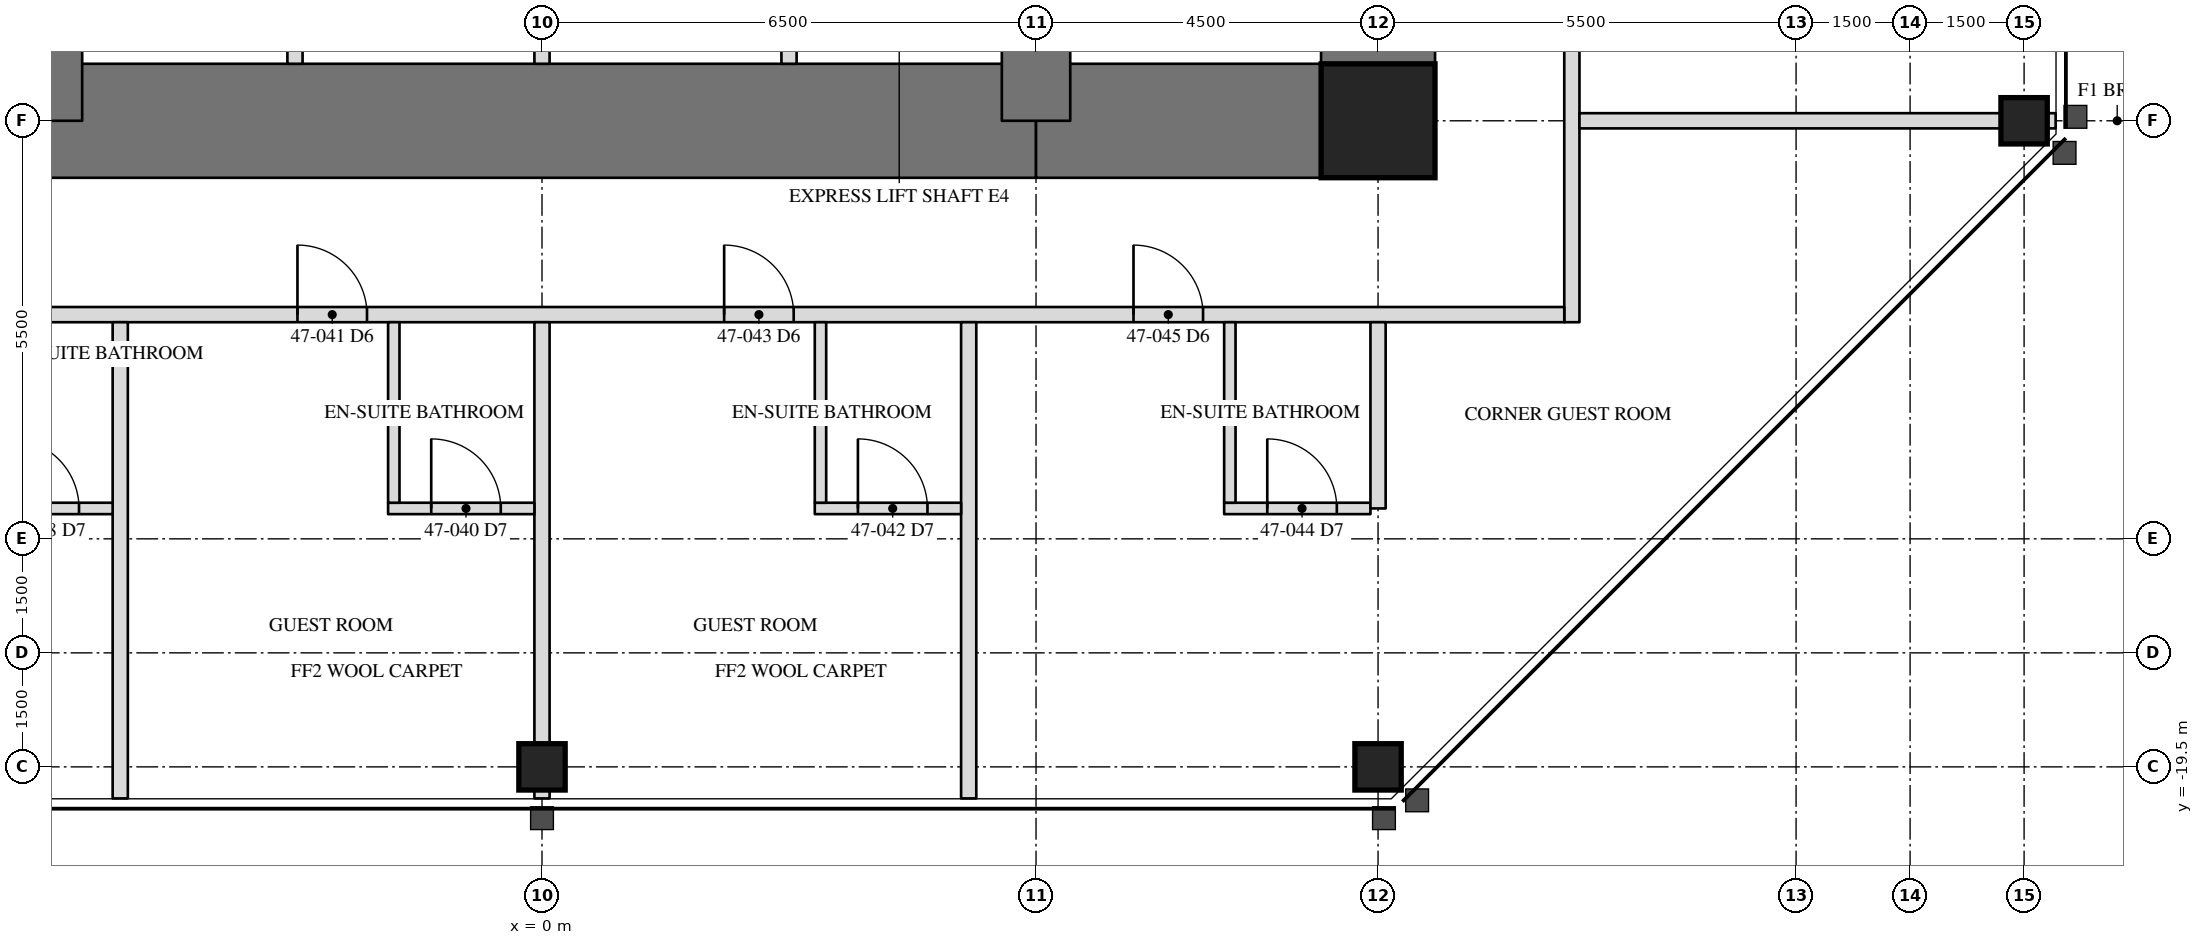
"""IFC4 building model, lengths in metres.
Left out: names, types, materials, properties, quantities, classifications, styles, units other than length and angle.
Written with IfcOpenShell. Run it as: python <this file> out.ifc"""

import sys

from ifc_helpers import new_model, si_unit, direction, frame, frame_2d, origin, origin_2d, place, context, subcontext, project, spatial, rectangle, hollow_rectangle, extrude, element, fill, save


model = new_model("IFC4")
c1 = context("Model", 3, precision=1e-05, world=origin(), true_north=direction((0.0, 1.0)))
c2 = subcontext(c1, "Body", "Model", "MODEL_VIEW")
j1 = project(units=[si_unit("LENGTHUNIT", "METRE"), si_unit("PLANEANGLEUNIT", "RADIAN")], contexts=[c1])
p1 = place(None, origin())
s1 = spatial("IfcSite", under=j1, at=p1, CompositionType="ELEMENT")
p2 = place(p1, origin())
s2 = spatial("IfcBuilding", under=s1, at=p2, CompositionType="ELEMENT")
p3 = place(p2, frame((0.0, 0.0, 201.2)))
s3 = spatial("IfcBuildingStorey", under=s2, at=p3, CompositionType="ELEMENT", Elevation=201.2)
for number, where, z_axis, x_axis in (
    (1, (0.0, -19.5, 0.0), (0.0, 0.0, 1.0), (1.0, 0.0, 0.0)),
    (2, (11.0, -19.5, 0.0), (0.0, 0.0, 1.0), (1.0, 0.0, 0.0)),
    (3, (19.5, -11.0, 0.0), (0.0, 0.0, 1.0), (0.0, 1.0, 0.0)),
):
    element("IfcColumn", number, at=place(p3, frame(where, z_axis=z_axis, x_axis=x_axis)), inside=s3, PredefinedType="COLUMN", context=c2, shape_type="SweptSolid", body=[
        extrude(hollow_rectangle(XDim=0.61, YDim=0.61, WallThickness=0.076, at=origin_2d()), origin(), (0.0, 0.0, 1.0), 3.5),
    ])
p4 = place(p3, frame((11.0, -11.0, 0.0), z_axis=(0.0, 0.0, 1.0), x_axis=(0.0, 1.0, 0.0)))
e4 = element("IfcWall", 4, at=p4, inside=s3, PredefinedType="SHEAR", context=c2, shape_type="SweptSolid", body=[
    extrude(rectangle(XDim=22.0, YDim=1.5, at=frame_2d((11.0, 0.0))), origin(), (0.0, 0.0, 1.0), 3.5),
])
p5 = place(p4, frame((15.393, 0.0, 0.0)))
e5 = element("IfcOpeningElement", 5, at=p5, cuts=e4, PredefinedType="OPENING", context=c2, shape_type="SweptSolid", body=[
    extrude(rectangle(XDim=0.915, YDim=2.134, at=frame_2d((0.458, 1.067))), frame((0.0, 0.76, 0.0), z_axis=(0.0, -1.0, 0.0), x_axis=(1.0, 0.0, 0.0)), (0.0, 0.0, 1.0), 1.52),
])
p6 = place(p3, frame((-6.5, -11.0, 0.0), z_axis=(0.0, 0.0, 1.0), x_axis=(1.0, 0.0, 0.0)))
e6 = element("IfcWall", 6, at=p6, inside=s3, PredefinedType="SHEAR", context=c2, shape_type="SweptSolid", body=[
    extrude(rectangle(XDim=13.0, YDim=1.5, at=frame_2d((6.5, 0.0))), origin(), (0.0, 0.0, 1.0), 3.5),
])
p7 = place(p3, frame((6.5, -11.0, 0.0), z_axis=(0.0, 0.0, 1.0), x_axis=(1.0, 0.0, 0.0)))
e7 = element("IfcWall", 7, at=p7, inside=s3, PredefinedType="SHEAR", context=c2, shape_type="SweptSolid", body=[
    extrude(rectangle(XDim=4.5, YDim=1.5, at=frame_2d((2.25, 0.0))), origin(), (0.0, 0.0, 1.0), 3.5),
])
for number, where, z_axis, x_axis in (
    (8, (6.5, -11.0, 0.0), (0.0, 0.0, 1.0), (0.0, 1.0, 0.0)),
    (9, (-6.5, -6.5, 0.0), (0.0, 0.0, 1.0), (0.0, -1.0, 0.0)),
):
    element("IfcWall", number, at=place(p3, frame(where, z_axis=z_axis, x_axis=x_axis)), inside=s3, PredefinedType="SHEAR", context=c2, shape_type="SweptSolid", body=[
        extrude(rectangle(XDim=4.5, YDim=0.9, at=frame_2d((2.25, 0.0))), origin(), (0.0, 0.0, 1.0), 3.5),
    ])
p8 = place(p3, frame((11.0, -11.0, 0.0), z_axis=(0.0, 0.0, 1.0), x_axis=(1.0, 0.0, 0.0)))
e10 = element("IfcColumn", 10, at=p8, inside=s3, PredefinedType="COLUMN", context=c2, shape_type="SweptSolid", body=[
    extrude(hollow_rectangle(XDim=1.499, YDim=1.499, WallThickness=0.102, at=origin_2d()), origin(), (0.0, 0.0, 1.0), 3.5),
])
for number, where, z_axis, x_axis in (
    (11, (-3.25, -10.25, 0.0), (0.0, 0.0, 1.0), (0.0, 1.0, 0.0)),
    (12, (0.0, -10.25, 0.0), (0.0, 0.0, 1.0), (0.0, 1.0, 0.0)),
    (13, (3.25, -10.25, 0.0), (0.0, 0.0, 1.0), (0.0, 1.0, 0.0)),
):
    element("IfcWall", number, at=place(p3, frame(where, z_axis=z_axis, x_axis=x_axis)), inside=s3, PredefinedType="PARTITIONING", context=c2, shape_type="SweptSolid", body=[
        extrude(rectangle(XDim=3.3, YDim=0.2, at=frame_2d((1.65, 0.0))), origin(), (0.0, 0.0, 1.0), 3.31),
    ])
p9 = place(p3, frame((13.55, -13.65, 0.0), z_axis=(0.0, 0.0, 1.0), x_axis=(0.0, 1.0, 0.0)))
e14 = element("IfcWall", 14, at=p9, inside=s3, PredefinedType="PARTITIONING", context=c2, shape_type="SweptSolid", body=[
    extrude(rectangle(XDim=27.1, YDim=0.2, at=frame_2d((13.55, 0.0))), origin(), (0.0, 0.0, 1.0), 3.31),
])
p10 = place(p9, frame((4.283, 0.0, 0.0)))
e15 = element("IfcOpeningElement", 15, at=p10, cuts=e14, PredefinedType="OPENING", context=c2, shape_type="SweptSolid", body=[
    extrude(rectangle(XDim=0.915, YDim=2.134, at=frame_2d((0.458, 1.067))), frame((0.0, 0.11, 0.0), z_axis=(0.0, -1.0, 0.0), x_axis=(1.0, 0.0, 0.0)), (0.0, 0.0, 1.0), 0.22),
])
p11 = place(p9, frame((10.433, 0.0, 0.0)))
e16 = element("IfcOpeningElement", 16, at=p11, cuts=e14, PredefinedType="OPENING", context=c2, shape_type="SweptSolid", body=[
    extrude(rectangle(XDim=0.915, YDim=2.134, at=frame_2d((0.458, 1.067))), frame((0.0, 0.11, 0.0), z_axis=(0.0, -1.0, 0.0), x_axis=(1.0, 0.0, 0.0)), (0.0, 0.0, 1.0), 0.22),
])
p12 = place(p9, frame((16.046, 0.0, 0.0)))
e17 = element("IfcOpeningElement", 17, at=p12, cuts=e14, PredefinedType="OPENING", context=c2, shape_type="SweptSolid", body=[
    extrude(rectangle(XDim=0.915, YDim=2.134, at=frame_2d((0.458, 1.067))), frame((0.0, 0.11, 0.0), z_axis=(0.0, -1.0, 0.0), x_axis=(1.0, 0.0, 0.0)), (0.0, 0.0, 1.0), 0.22),
])
p13 = place(p9, frame((21.433, 0.0, 0.0)))
e18 = element("IfcOpeningElement", 18, at=p13, cuts=e14, PredefinedType="OPENING", context=c2, shape_type="SweptSolid", body=[
    extrude(rectangle(XDim=0.915, YDim=2.134, at=frame_2d((0.458, 1.067))), frame((0.0, 0.11, 0.0), z_axis=(0.0, -1.0, 0.0), x_axis=(1.0, 0.0, 0.0)), (0.0, 0.0, 1.0), 0.22),
])
p14 = place(p3, frame((-13.65, -13.55, 0.0), z_axis=(0.0, 0.0, 1.0), x_axis=(1.0, 0.0, 0.0)))
e19 = element("IfcWall", 19, at=p14, inside=s3, PredefinedType="PARTITIONING", context=c2, shape_type="SweptSolid", body=[
    extrude(rectangle(XDim=27.1, YDim=0.2, at=frame_2d((13.55, 0.0))), origin(), (0.0, 0.0, 1.0), 3.31),
])
p15 = place(p14, frame((4.884, 0.0, 0.0)))
e20 = element("IfcOpeningElement", 20, at=p15, cuts=e19, PredefinedType="OPENING", context=c2, shape_type="SweptSolid", body=[
    extrude(rectangle(XDim=0.915, YDim=2.134, at=frame_2d((0.458, 1.067))), frame((0.0, 0.11, 0.0), z_axis=(0.0, -1.0, 0.0), x_axis=(1.0, 0.0, 0.0)), (0.0, 0.0, 1.0), 0.22),
])
p16 = place(p14, frame((10.433, 0.0, 0.0)))
e21 = element("IfcOpeningElement", 21, at=p16, cuts=e19, PredefinedType="OPENING", context=c2, shape_type="SweptSolid", body=[
    extrude(rectangle(XDim=0.915, YDim=2.134, at=frame_2d((0.458, 1.067))), frame((0.0, 0.11, 0.0), z_axis=(0.0, -1.0, 0.0), x_axis=(1.0, 0.0, 0.0)), (0.0, 0.0, 1.0), 0.22),
])
p17 = place(p14, frame((16.046, 0.0, 0.0)))
e22 = element("IfcOpeningElement", 22, at=p17, cuts=e19, PredefinedType="OPENING", context=c2, shape_type="SweptSolid", body=[
    extrude(rectangle(XDim=0.915, YDim=2.134, at=frame_2d((0.458, 1.067))), frame((0.0, 0.11, 0.0), z_axis=(0.0, -1.0, 0.0), x_axis=(1.0, 0.0, 0.0)), (0.0, 0.0, 1.0), 0.22),
])
p18 = place(p14, frame((21.433, 0.0, 0.0)))
e23 = element("IfcOpeningElement", 23, at=p18, cuts=e19, PredefinedType="OPENING", context=c2, shape_type="SweptSolid", body=[
    extrude(rectangle(XDim=0.915, YDim=2.134, at=frame_2d((0.458, 1.067))), frame((0.0, 0.11, 0.0), z_axis=(0.0, -1.0, 0.0), x_axis=(1.0, 0.0, 0.0)), (0.0, 0.0, 1.0), 0.22),
])
p19 = place(p3, frame((13.65, -11.0, 0.0), z_axis=(0.0, 0.0, 1.0), x_axis=(1.0, 0.0, 0.0)))
e24 = element("IfcWall", 24, at=p19, inside=s3, PredefinedType="PARTITIONING", context=c2, shape_type="SweptSolid", body=[
    extrude(rectangle(XDim=6.265, YDim=0.2, at=frame_2d((3.133, 0.0))), origin(), (0.0, 0.0, 1.0), 2.802),
])
p20 = place(p3, frame((-5.549, -13.65, 0.0), z_axis=(0.0, 0.0, 1.0), x_axis=(0.0, -1.0, 0.0)))
e25 = element("IfcWall", 25, at=p20, inside=s3, PredefinedType="PARTITIONING", context=c2, shape_type="SweptSolid", body=[
    extrude(rectangle(XDim=6.265, YDim=0.2, at=frame_2d((3.133, 0.0))), origin(), (0.0, 0.0, 1.0), 3.31),
])
p21 = place(p3, frame((0.0, -13.65, 0.0), z_axis=(0.0, 0.0, 1.0), x_axis=(0.0, -1.0, 0.0)))
e26 = element("IfcWall", 26, at=p21, inside=s3, PredefinedType="PARTITIONING", context=c2, shape_type="SweptSolid", body=[
    extrude(rectangle(XDim=6.265, YDim=0.2, at=frame_2d((3.133, 0.0))), origin(), (0.0, 0.0, 1.0), 2.802),
])
p22 = place(p3, frame((5.614, -13.65, 0.0), z_axis=(0.0, 0.0, 1.0), x_axis=(0.0, -1.0, 0.0)))
e27 = element("IfcWall", 27, at=p22, inside=s3, PredefinedType="PARTITIONING", context=c2, shape_type="SweptSolid", body=[
    extrude(rectangle(XDim=6.265, YDim=0.2, at=frame_2d((3.133, 0.0))), origin(), (0.0, 0.0, 1.0), 3.31),
])
p23 = place(p3, frame((-7.574, -16.1, 0.0), z_axis=(0.0, 0.0, 1.0), x_axis=(1.0, 0.0, 0.0)))
e28 = element("IfcWall", 28, at=p23, inside=s3, PredefinedType="PARTITIONING", context=c2, shape_type="SweptSolid", body=[
    extrude(rectangle(XDim=1.925, YDim=0.15, at=frame_2d((0.962, 0.0))), origin(), (0.0, 0.0, 1.0), 3.31),
])
p24 = place(p23, frame((0.567, 0.0, 0.0)))
e29 = element("IfcOpeningElement", 29, at=p24, cuts=e28, PredefinedType="OPENING", context=c2, shape_type="SweptSolid", body=[
    extrude(rectangle(XDim=0.915, YDim=2.032, at=frame_2d((0.458, 1.016))), frame((0.0, 0.085, 0.0), z_axis=(0.0, -1.0, 0.0), x_axis=(1.0, 0.0, 0.0)), (0.0, 0.0, 1.0), 0.17),
])
p25 = place(p3, frame((-2.025, -16.1, 0.0), z_axis=(0.0, 0.0, 1.0), x_axis=(1.0, 0.0, 0.0)))
e30 = element("IfcWall", 30, at=p25, inside=s3, PredefinedType="PARTITIONING", context=c2, shape_type="SweptSolid", body=[
    extrude(rectangle(XDim=1.925, YDim=0.15, at=frame_2d((0.962, 0.0))), origin(), (0.0, 0.0, 1.0), 3.31),
])
p26 = place(p25, frame((0.567, 0.0, 0.0)))
e31 = element("IfcOpeningElement", 31, at=p26, cuts=e30, PredefinedType="OPENING", context=c2, shape_type="SweptSolid", body=[
    extrude(rectangle(XDim=0.915, YDim=2.032, at=frame_2d((0.458, 1.016))), frame((0.0, 0.085, 0.0), z_axis=(0.0, -1.0, 0.0), x_axis=(1.0, 0.0, 0.0)), (0.0, 0.0, 1.0), 0.17),
])
p27 = place(p3, frame((-1.95, -13.65, 0.0), z_axis=(0.0, 0.0, 1.0), x_axis=(0.0, -1.0, 0.0)))
e32 = element("IfcWall", 32, at=p27, inside=s3, PredefinedType="PARTITIONING", context=c2, shape_type="SweptSolid", body=[
    extrude(rectangle(XDim=2.375, YDim=0.15, at=frame_2d((1.188, 0.0))), origin(), (0.0, 0.0, 1.0), 3.31),
])
p28 = place(p3, frame((3.589, -16.1, 0.0), z_axis=(0.0, 0.0, 1.0), x_axis=(1.0, 0.0, 0.0)))
e33 = element("IfcWall", 33, at=p28, inside=s3, PredefinedType="PARTITIONING", context=c2, shape_type="SweptSolid", body=[
    extrude(rectangle(XDim=1.925, YDim=0.15, at=frame_2d((0.962, 0.0))), origin(), (0.0, 0.0, 1.0), 3.31),
])
p29 = place(p28, frame((0.567, 0.0, 0.0)))
e34 = element("IfcOpeningElement", 34, at=p29, cuts=e33, PredefinedType="OPENING", context=c2, shape_type="SweptSolid", body=[
    extrude(rectangle(XDim=0.915, YDim=2.032, at=frame_2d((0.458, 1.016))), frame((0.0, 0.085, 0.0), z_axis=(0.0, -1.0, 0.0), x_axis=(1.0, 0.0, 0.0)), (0.0, 0.0, 1.0), 0.17),
])
p30 = place(p3, frame((3.664, -13.65, 0.0), z_axis=(0.0, 0.0, 1.0), x_axis=(0.0, -1.0, 0.0)))
e35 = element("IfcWall", 35, at=p30, inside=s3, PredefinedType="PARTITIONING", context=c2, shape_type="SweptSolid", body=[
    extrude(rectangle(XDim=2.375, YDim=0.15, at=frame_2d((1.188, 0.0))), origin(), (0.0, 0.0, 1.0), 2.703),
])
p31 = place(p3, frame((8.975, -16.1, 0.0), z_axis=(0.0, 0.0, 1.0), x_axis=(1.0, 0.0, 0.0)))
e36 = element("IfcWall", 36, at=p31, inside=s3, PredefinedType="PARTITIONING", context=c2, shape_type="SweptSolid", body=[
    extrude(rectangle(XDim=1.925, YDim=0.15, at=frame_2d((0.962, 0.0))), origin(), (0.0, 0.0, 1.0), 3.31),
])
p32 = place(p31, frame((0.567, 0.0, 0.0)))
e37 = element("IfcOpeningElement", 37, at=p32, cuts=e36, PredefinedType="OPENING", context=c2, shape_type="SweptSolid", body=[
    extrude(rectangle(XDim=0.915, YDim=2.032, at=frame_2d((0.458, 1.016))), frame((0.0, 0.085, 0.0), z_axis=(0.0, -1.0, 0.0), x_axis=(1.0, 0.0, 0.0)), (0.0, 0.0, 1.0), 0.17),
])
p33 = place(p3, frame((9.05, -13.65, 0.0), z_axis=(0.0, 0.0, 1.0), x_axis=(0.0, -1.0, 0.0)))
e38 = element("IfcWall", 38, at=p33, inside=s3, PredefinedType="PARTITIONING", context=c2, shape_type="SweptSolid", body=[
    extrude(rectangle(XDim=2.375, YDim=0.15, at=frame_2d((1.188, 0.0))), origin(), (0.0, 0.0, 1.0), 3.31),
])
p34 = place(p3, frame((11.0, -13.65, 0.0), z_axis=(0.0, 0.0, 1.0), x_axis=(0.0, -1.0, 0.0)))
e39 = element("IfcWall", 39, at=p34, inside=s3, PredefinedType="PARTITIONING", context=c2, shape_type="SweptSolid", body=[
    extrude(rectangle(XDim=2.45, YDim=0.2, at=frame_2d((1.225, 0.0))), origin(), (0.0, 0.0, 1.0), 2.802),
])
p35 = place(p24, origin())
e40 = element("IfcDoor", 40, at=p35, inside=s3, OperationType="SINGLE_SWING_LEFT", PredefinedType="DOOR", context=c2, shape_type="SweptSolid", body=[
    extrude(rectangle(XDim=0.915, YDim=2.032, at=frame_2d((0.458, 1.016))), frame((0.0, 0.025, 0.0), z_axis=(0.0, -1.0, 0.0), x_axis=(1.0, 0.0, 0.0)), (0.0, 0.0, 1.0), 0.05),
])
fill(e29, e40)
p36 = place(p26, origin())
e41 = element("IfcDoor", 41, at=p36, inside=s3, OperationType="SINGLE_SWING_LEFT", PredefinedType="DOOR", context=c2, shape_type="SweptSolid", body=[
    extrude(rectangle(XDim=0.915, YDim=2.032, at=frame_2d((0.458, 1.016))), frame((0.0, 0.025, 0.0), z_axis=(0.0, -1.0, 0.0), x_axis=(1.0, 0.0, 0.0)), (0.0, 0.0, 1.0), 0.05),
])
fill(e31, e41)
p37 = place(p16, origin())
e42 = element("IfcDoor", 42, at=p37, inside=s3, OperationType="SINGLE_SWING_LEFT", PredefinedType="DOOR", context=c2, shape_type="SweptSolid", body=[
    extrude(rectangle(XDim=0.915, YDim=2.134, at=frame_2d((0.458, 1.067))), frame((0.0, 0.025, 0.0), z_axis=(0.0, -1.0, 0.0), x_axis=(1.0, 0.0, 0.0)), (0.0, 0.0, 1.0), 0.05),
])
fill(e21, e42)
p38 = place(p29, origin())
e43 = element("IfcDoor", 43, at=p38, inside=s3, OperationType="SINGLE_SWING_LEFT", PredefinedType="DOOR", context=c2, shape_type="SweptSolid", body=[
    extrude(rectangle(XDim=0.915, YDim=2.032, at=frame_2d((0.458, 1.016))), frame((0.0, 0.025, 0.0), z_axis=(0.0, -1.0, 0.0), x_axis=(1.0, 0.0, 0.0)), (0.0, 0.0, 1.0), 0.05),
])
fill(e34, e43)
p39 = place(p17, origin())
e44 = element("IfcDoor", 44, at=p39, inside=s3, OperationType="SINGLE_SWING_LEFT", PredefinedType="DOOR", context=c2, shape_type="SweptSolid", body=[
    extrude(rectangle(XDim=0.915, YDim=2.134, at=frame_2d((0.458, 1.067))), frame((0.0, 0.025, 0.0), z_axis=(0.0, -1.0, 0.0), x_axis=(1.0, 0.0, 0.0)), (0.0, 0.0, 1.0), 0.05),
])
fill(e22, e44)
p40 = place(p32, origin())
e45 = element("IfcDoor", 45, at=p40, inside=s3, OperationType="SINGLE_SWING_LEFT", PredefinedType="DOOR", context=c2, shape_type="SweptSolid", body=[
    extrude(rectangle(XDim=0.915, YDim=2.032, at=frame_2d((0.458, 1.016))), frame((0.0, 0.025, 0.0), z_axis=(0.0, -1.0, 0.0), x_axis=(1.0, 0.0, 0.0)), (0.0, 0.0, 1.0), 0.05),
])
fill(e37, e45)
p41 = place(p18, origin())
e46 = element("IfcDoor", 46, at=p41, inside=s3, OperationType="SINGLE_SWING_LEFT", PredefinedType="DOOR", context=c2, shape_type="SweptSolid", body=[
    extrude(rectangle(XDim=0.915, YDim=2.134, at=frame_2d((0.458, 1.067))), frame((0.0, 0.025, 0.0), z_axis=(0.0, -1.0, 0.0), x_axis=(1.0, 0.0, 0.0)), (0.0, 0.0, 1.0), 0.05),
])
fill(e23, e46)
save(model, sys.argv[1])
